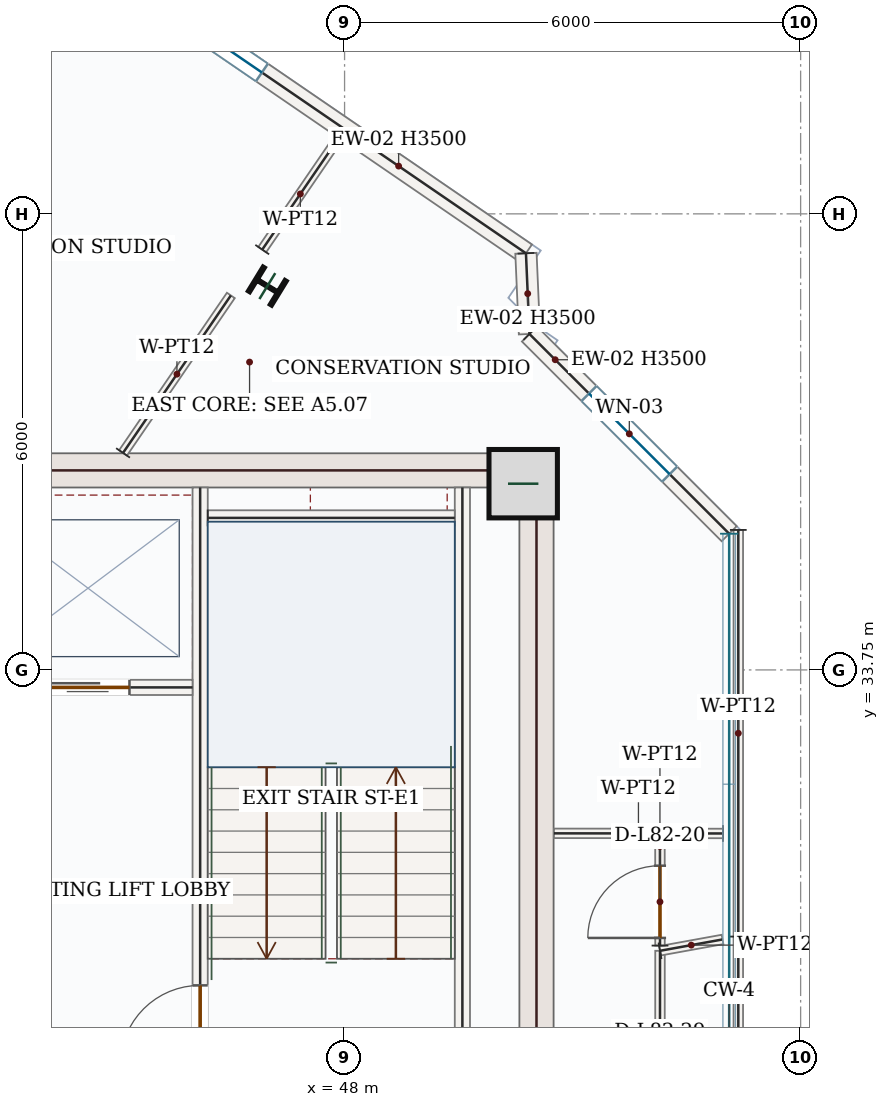
"""IFC4 building model, lengths in metres.
Left out: names, types, materials, properties, quantities, classifications, styles, units other than length and angle.
Written with IfcOpenShell. Run it as: python <this file> out.ifc"""

import sys

from ifc_helpers import new_model, si_unit, direction, frame, frame_2d, origin, origin_2d, place, context, subcontext, project, spatial, rectangle, i_section, extrude, source, transform, mapped, element, fill, save


model = new_model("IFC4")
c1 = context("Model", 3, precision=1e-05, world=origin(), true_north=direction((0.0, 1.0)))
c2 = subcontext(c1, "Body", "Model", "MODEL_VIEW")
j1 = project(units=[si_unit("LENGTHUNIT", "METRE"), si_unit("PLANEANGLEUNIT", "RADIAN")], contexts=[c1])
p1 = place(None, origin())
s1 = spatial("IfcSite", under=j1, at=p1, CompositionType="ELEMENT")
p2 = place(p1, origin())
s2 = spatial("IfcBuilding", under=s1, at=p2, CompositionType="ELEMENT")
p3 = place(p2, frame((0.0, 0.0, 338.55)))
s3 = spatial("IfcBuildingStorey", under=s2, at=p3, CompositionType="ELEMENT", Elevation=338.55)
m1 = source(origin(), c2, "Body", "SweptSolid", [
    extrude(rectangle(XDim=8.55, YDim=0.45, at=frame_2d((4.275, 0.0))), origin(), (0.0, 0.0, 1.0), 3.5),
])
p4 = place(p3, frame((50.525, 28.05, 0.0), z_axis=(0.0, 0.0, 1.0), x_axis=(0.0, 1.0, 0.0)))
e1 = element("IfcWall", 1, at=p4, inside=s3, PredefinedType="SHEAR", context=c2, shape_type="MappedRepresentation", body=[
    mapped(m1, transform((0.0, 0.0, 0.0), x_axis=(1.0, 0.0, 0.0), y_axis=(0.0, 1.0, 0.0), z_axis=(0.0, 0.0, 1.0), scale=1.0)),
])
m2 = source(origin(), c2, "Body", "SweptSolid", [
    extrude(rectangle(XDim=7.1, YDim=0.45, at=frame_2d((3.55, 0.0))), origin(), (0.0, 0.0, 1.0), 3.5),
])
p5 = place(p3, frame((43.2, 36.375, 0.0), z_axis=(0.0, 0.0, 1.0), x_axis=(1.0, 0.0, 0.0)))
e2 = element("IfcWall", 2, at=p5, inside=s3, PredefinedType="SHEAR", context=c2, shape_type="MappedRepresentation", body=[
    mapped(m2, transform((0.0, 0.0, 0.0), x_axis=(1.0, 0.0, 0.0), y_axis=(0.0, 1.0, 0.0), z_axis=(0.0, 0.0, 1.0), scale=1.0)),
])
m3 = source(origin(), c2, "Body", "SweptSolid", [
    extrude(rectangle(XDim=0.9, YDim=0.9, at=origin_2d()), origin(), (0.0, 0.0, 1.0), 3.75),
])
p6 = place(p3, frame((50.35, 36.2, 0.0), z_axis=(0.0, 0.0, 1.0), x_axis=(1.0, 0.0, 0.0)))
e3 = element("IfcColumn", 3, at=p6, inside=s3, PredefinedType="COLUMN", context=c2, shape_type="MappedRepresentation", body=[
    mapped(m3, transform((0.0, 0.0, 0.0), x_axis=(1.0, 0.0, 0.0), y_axis=(0.0, 1.0, 0.0), z_axis=(0.0, 0.0, 1.0), scale=1.0)),
])
m4 = source(origin(), c2, "Body", "SweptSolid", [
    extrude(i_section(OverallWidth=0.369, OverallDepth=0.356, WebThickness=0.011, FlangeThickness=0.018, FilletRadius=0.018, at=origin_2d()), origin(), (0.0, 0.0, 1.0), 3.75),
])
p7 = place(p3, frame((46.984, 38.8, 0.0), z_axis=(0.0, 0.0, 1.0), x_axis=(0.522498564716, 0.852640164354, 0.0)))
e4 = element("IfcColumn", 4, at=p7, inside=s3, PredefinedType="COLUMN", context=c2, shape_type="MappedRepresentation", body=[
    mapped(m4, transform((0.0, 0.0, 0.0), x_axis=(1.0, 0.0, 0.0), y_axis=(0.0, 1.0, 0.0), z_axis=(0.0, 0.0, 1.0), scale=1.0)),
])
p8 = place(p3, frame((42.201, 44.836, 0.0), z_axis=(0.0, 0.0, 1.0), x_axis=(0.825121888295, -0.56495474992, 0.0)))
e5 = element("IfcWall", 5, at=p8, inside=s3, PredefinedType="SOLIDWALL", context=c2, shape_type="SweptSolid", body=[
    extrude(rectangle(XDim=9.92, YDim=0.28, at=frame_2d((4.96, 0.0))), origin(), (0.0, 0.0, 1.0), 3.5),
])
p9 = place(p8, frame((4.21, 0.0, 0.85)))
e6 = element("IfcOpeningElement", 6, at=p9, cuts=e5, PredefinedType="OPENING", context=c2, shape_type="SweptSolid", body=[
    extrude(rectangle(XDim=1.5, YDim=1.5, at=frame_2d((0.75, 0.75))), frame((0.0, 0.15, 0.0), z_axis=(0.0, -1.0, 0.0), x_axis=(1.0, 0.0, 0.0)), (0.0, 0.0, 1.0), 0.3),
])
m5 = source(origin(), c2, "Body", "SweptSolid", [
    extrude(rectangle(XDim=1.063, YDim=0.28, at=frame_2d((0.531, 0.0))), origin(), (0.0, 0.0, 1.0), 3.5),
])
p10 = place(p3, frame((50.386, 39.231, 0.0), z_axis=(0.0, 0.0, 1.0), x_axis=(0.043417286211, -0.999057025028, 0.0)))
e7 = element("IfcWall", 7, at=p10, inside=s3, PredefinedType="SOLIDWALL", context=c2, shape_type="MappedRepresentation", body=[
    mapped(m5, transform((0.0, 0.0, 0.0), x_axis=(1.0, 0.0, 0.0), y_axis=(0.0, 1.0, 0.0), z_axis=(0.0, 0.0, 1.0), scale=1.0)),
])
p11 = place(p3, frame((50.432, 38.17, 0.0), z_axis=(0.0, 0.0, 1.0), x_axis=(0.707106781187, -0.707106781187, 0.0)))
e8 = element("IfcWall", 8, at=p11, inside=s3, PredefinedType="SOLIDWALL", context=c2, shape_type="SweptSolid", body=[
    extrude(rectangle(XDim=3.716, YDim=0.28, at=frame_2d((1.858, 0.0))), origin(), (0.0, 0.0, 1.0), 3.5),
])
p12 = place(p11, frame((1.108, 0.0, 0.85)))
e9 = element("IfcOpeningElement", 9, at=p12, cuts=e8, PredefinedType="OPENING", context=c2, shape_type="SweptSolid", body=[
    extrude(rectangle(XDim=1.5, YDim=1.5, at=frame_2d((0.75, 0.75))), frame((0.0, 0.15, 0.0), z_axis=(0.0, -1.0, 0.0), x_axis=(1.0, 0.0, 0.0)), (0.0, 0.0, 1.0), 0.3),
])
m6 = source(origin(), c2, "Body", "SweptSolid", [
    extrude(rectangle(XDim=7.87, YDim=0.2, at=frame_2d((3.935, 0.0))), origin(), (0.0, 0.0, 1.0), 3.5),
])
p13 = place(p3, frame((49.55, 28.28, 0.0), z_axis=(0.0, 0.0, 1.0), x_axis=(0.0, 1.0, 0.0)))
e10 = element("IfcWall", 10, at=p13, inside=s3, PredefinedType="SOLIDWALL", context=c2, shape_type="MappedRepresentation", body=[
    mapped(m6, transform((0.0, 0.0, 0.0), x_axis=(1.0, 0.0, 0.0), y_axis=(0.0, 1.0, 0.0), z_axis=(0.0, 0.0, 1.0), scale=1.0)),
])
p14 = place(p3, frame((46.1, 28.15, 0.0), z_axis=(0.0, 0.0, 1.0), x_axis=(0.0, 1.0, 0.0)))
e11 = element("IfcWall", 11, at=p14, inside=s3, PredefinedType="SOLIDWALL", context=c2, shape_type="SweptSolid", body=[
    extrude(rectangle(XDim=8.0, YDim=0.2, at=frame_2d((4.0, 0.0))), origin(), (0.0, 0.0, 1.0), 3.5),
])
p15 = place(p14, frame((0.4, 0.0, 0.0)))
e12 = element("IfcOpeningElement", 12, at=p15, cuts=e11, PredefinedType="OPENING", context=c2, shape_type="SweptSolid", body=[
    extrude(rectangle(XDim=1.05, YDim=2.15, at=frame_2d((0.525, 1.075))), frame((0.0, 0.11, 0.0), z_axis=(0.0, -1.0, 0.0), x_axis=(1.0, 0.0, 0.0)), (0.0, 0.0, 1.0), 0.22),
])
m7 = source(origin(), c2, "Body", "SweptSolid", [
    extrude(rectangle(XDim=3.25, YDim=0.2, at=frame_2d((1.625, 0.0))), origin(), (0.0, 0.0, 1.0), 3.5),
])
p16 = place(p3, frame((46.2, 35.75, 0.0), z_axis=(0.0, 0.0, 1.0), x_axis=(1.0, 0.0, 0.0)))
e13 = element("IfcWall", 13, at=p16, inside=s3, PredefinedType="SOLIDWALL", context=c2, shape_type="MappedRepresentation", body=[
    mapped(m7, transform((0.0, 0.0, 0.0), x_axis=(1.0, 0.0, 0.0), y_axis=(0.0, 1.0, 0.0), z_axis=(0.0, 0.0, 1.0), scale=1.0)),
])
p17 = place(p3, frame((43.25, 33.52, 0.0), z_axis=(0.0, 0.0, 1.0), x_axis=(1.0, 0.0, 0.0)))
e14 = element("IfcWall", 14, at=p17, inside=s3, PredefinedType="SOLIDWALL", context=c2, shape_type="SweptSolid", body=[
    extrude(rectangle(XDim=2.75, YDim=0.2, at=frame_2d((1.375, 0.0))), origin(), (0.0, 0.0, 1.0), 3.5),
])
p18 = place(p17, frame((0.82, 0.0, 0.0)))
e15 = element("IfcOpeningElement", 15, at=p18, cuts=e14, PredefinedType="OPENING", context=c2, shape_type="SweptSolid", body=[
    extrude(rectangle(XDim=1.1, YDim=2.15, at=frame_2d((0.55, 1.075))), frame((0.0, 0.11, 0.0), z_axis=(0.0, -1.0, 0.0), x_axis=(1.0, 0.0, 0.0)), (0.0, 0.0, 1.0), 0.22),
])
p19 = place(p3, frame((52.147, 22.47, 0.0), z_axis=(0.0, 0.0, 1.0), x_axis=(0.000321874581, 0.999999948198, 0.0)))
e16 = element("IfcWall", 16, at=p19, inside=s3, PredefinedType="PARTITIONING", context=c2, shape_type="SweptSolid", body=[
    extrude(rectangle(XDim=7.585, YDim=0.125, at=frame_2d((3.792, 0.0))), origin(), (0.0, 0.0, 1.0), 3.5),
])
p20 = place(p19, frame((5.175, 0.0, 0.0)))
e17 = element("IfcOpeningElement", 17, at=p20, cuts=e16, PredefinedType="OPENING", context=c2, shape_type="SweptSolid", body=[
    extrude(rectangle(XDim=0.95, YDim=2.15, at=frame_2d((0.475, 1.075))), frame((0.0, 0.073, 0.0), z_axis=(0.0, -1.0, 0.0), x_axis=(1.0, 0.0, 0.0)), (0.0, 0.0, 1.0), 0.145),
])
m8 = source(origin(), c2, "Body", "SweptSolid", [
    extrude(rectangle(XDim=0.836, YDim=0.125, at=frame_2d((0.418, 0.0))), origin(), (0.0, 0.0, 1.0), 3.5),
])
p21 = place(p3, frame((52.15, 30.055, 0.0), z_axis=(0.0, 0.0, 1.0), x_axis=(0.983949253333, 0.178448499195, 0.0)))
e18 = element("IfcWall", 18, at=p21, inside=s3, PredefinedType="PARTITIONING", context=c2, shape_type="MappedRepresentation", body=[
    mapped(m8, transform((0.0, 0.0, 0.0), x_axis=(1.0, 0.0, 0.0), y_axis=(0.0, 1.0, 0.0), z_axis=(0.0, 0.0, 1.0), scale=1.0)),
])
m9 = source(origin(), c2, "Body", "SweptSolid", [
    extrude(rectangle(XDim=6.777, YDim=0.125, at=frame_2d((3.388, 0.0))), origin(), (0.0, 0.0, 1.0), 3.5),
])
p22 = place(p3, frame((53.18, 30.242, 0.0), z_axis=(0.0, 0.0, 1.0), x_axis=(7.2053896e-05, -0.999999997404, 0.0)))
e19 = element("IfcWall", 19, at=p22, inside=s3, PredefinedType="PARTITIONING", context=c2, shape_type="MappedRepresentation", body=[
    mapped(m9, transform((0.0, 0.0, 0.0), x_axis=(1.0, 0.0, 0.0), y_axis=(0.0, 1.0, 0.0), z_axis=(0.0, 0.0, 1.0), scale=1.0)),
])
m10 = source(origin(), c2, "Body", "SweptSolid", [
    extrude(rectangle(XDim=2.223, YDim=0.125, at=frame_2d((1.111, 0.0))), origin(), (0.0, 0.0, 1.0), 3.5),
])
p23 = place(p3, frame((52.978, 31.598, 0.0), z_axis=(0.0, 0.0, 1.0), x_axis=(-0.999999704402, 0.000768892567, 0.0)))
e20 = element("IfcWall", 20, at=p23, inside=s3, PredefinedType="PARTITIONING", context=c2, shape_type="MappedRepresentation", body=[
    mapped(m10, transform((0.0, 0.0, 0.0), x_axis=(1.0, 0.0, 0.0), y_axis=(0.0, 1.0, 0.0), z_axis=(0.0, 0.0, 1.0), scale=1.0)),
])
m11 = source(origin(), c2, "Body", "SweptSolid", [
    extrude(rectangle(XDim=2.511, YDim=0.125, at=frame_2d((1.255, 0.0))), origin(), (0.0, 0.0, 1.0), 3.5),
])
p24 = place(p3, frame((45.085, 36.605, 0.0), z_axis=(0.0, 0.0, 1.0), x_axis=(0.564980194272, 0.825104466162, 0.0)))
e21 = element("IfcWall", 21, at=p24, inside=s3, PredefinedType="PARTITIONING", context=c2, shape_type="MappedRepresentation", body=[
    mapped(m11, transform((0.0, 0.0, 0.0), x_axis=(1.0, 0.0, 0.0), y_axis=(0.0, 1.0, 0.0), z_axis=(0.0, 0.0, 1.0), scale=1.0)),
])
m12 = source(origin(), c2, "Body", "SweptSolid", [
    extrude(rectangle(XDim=1.775, YDim=0.125, at=frame_2d((0.888, 0.0))), origin(), (0.0, 0.0, 1.0), 3.5),
])
p25 = place(p3, frame((46.917, 39.28, 0.0), z_axis=(0.0, 0.0, 1.0), x_axis=(0.56509798207, 0.825023800057, 0.0)))
e22 = element("IfcWall", 22, at=p25, inside=s3, PredefinedType="PARTITIONING", context=c2, shape_type="MappedRepresentation", body=[
    mapped(m12, transform((0.0, 0.0, 0.0), x_axis=(1.0, 0.0, 0.0), y_axis=(0.0, 1.0, 0.0), z_axis=(0.0, 0.0, 1.0), scale=1.0)),
])
m13 = source(origin(), c2, "Body", "SweptSolid", [
    extrude(rectangle(XDim=5.35, YDim=0.125, at=frame_2d((2.675, 0.0))), origin(), (0.0, 0.0, 1.0), 3.5),
])
p26 = place(p3, frame((53.18, 35.592, 0.0), z_axis=(0.0, 0.0, 1.0), x_axis=(0.0, -1.0, 0.0)))
e23 = element("IfcWall", 23, at=p26, inside=s3, PredefinedType="PARTITIONING", context=c2, shape_type="MappedRepresentation", body=[
    mapped(m13, transform((0.0, 0.0, 0.0), x_axis=(1.0, 0.0, 0.0), y_axis=(0.0, 1.0, 0.0), z_axis=(0.0, 0.0, 1.0), scale=1.0)),
])
p27 = place(p3, frame((52.15, 30.124, 0.0), z_axis=(0.0, 0.0, 1.0), x_axis=(-0.000520201074, 0.999999864695, 0.0)))
e24 = element("IfcWall", 24, at=p27, inside=s3, PredefinedType="PARTITIONING", context=c2, shape_type="SweptSolid", body=[
    extrude(rectangle(XDim=1.408, YDim=0.125, at=frame_2d((0.704, 0.0))), origin(), (0.0, 0.0, 1.0), 3.5),
])
p28 = place(p27, frame((0.101, 0.0, 0.0)))
e25 = element("IfcOpeningElement", 25, at=p28, cuts=e24, PredefinedType="OPENING", context=c2, shape_type="SweptSolid", body=[
    extrude(rectangle(XDim=0.95, YDim=2.15, at=frame_2d((0.475, 1.075))), frame((0.0, 0.073, 0.0), z_axis=(0.0, -1.0, 0.0), x_axis=(1.0, 0.0, 0.0)), (0.0, 0.0, 1.0), 0.145),
])
m14 = source(origin(), c2, "Body", "SweptSolid", [
    extrude(rectangle(XDim=1.5, YDim=1.5, at=frame_2d((0.75, 0.75))), frame((0.0, 0.03, 0.0), z_axis=(0.0, -1.0, 0.0), x_axis=(1.0, 0.0, 0.0)), (0.0, 0.0, 1.0), 0.06),
])
p29 = place(p9, origin())
e26 = element("IfcWindow", 26, at=p29, inside=s3, PartitioningType="SINGLE_PANEL", PredefinedType="WINDOW", context=c2, shape_type="MappedRepresentation", body=[
    mapped(m14, transform((0.0, 0.0, 0.0), x_axis=(1.0, 0.0, 0.0), y_axis=(0.0, 1.0, 0.0), z_axis=(0.0, 0.0, 1.0), scale=1.0)),
])
fill(e6, e26)
p30 = place(p12, origin())
e27 = element("IfcWindow", 27, at=p30, inside=s3, PartitioningType="SINGLE_PANEL", PredefinedType="WINDOW", context=c2, shape_type="MappedRepresentation", body=[
    mapped(m14, transform((0.0, 0.0, 0.0), x_axis=(1.0, 0.0, 0.0), y_axis=(0.0, 1.0, 0.0), z_axis=(0.0, 0.0, 1.0), scale=1.0)),
])
fill(e9, e27)
m15 = source(origin(), c2, "Body", "SweptSolid", [
    extrude(rectangle(XDim=1.05, YDim=2.15, at=frame_2d((0.525, 1.075))), frame((0.0, 0.025, 0.0), z_axis=(0.0, -1.0, 0.0), x_axis=(1.0, 0.0, 0.0)), (0.0, 0.0, 1.0), 0.05),
])
p31 = place(p15, origin())
e28 = element("IfcDoor", 28, at=p31, inside=s3, OperationType="SINGLE_SWING_LEFT", PredefinedType="DOOR", context=c2, shape_type="MappedRepresentation", body=[
    mapped(m15, transform((0.0, 0.0, 0.0), x_axis=(1.0, 0.0, 0.0), y_axis=(0.0, 1.0, 0.0), z_axis=(0.0, 0.0, 1.0), scale=1.0)),
])
fill(e12, e28)
m16 = source(origin(), c2, "Body", "SweptSolid", [
    extrude(rectangle(XDim=1.1, YDim=2.15, at=frame_2d((0.55, 1.075))), frame((0.0, 0.025, 0.0), z_axis=(0.0, -1.0, 0.0), x_axis=(1.0, 0.0, 0.0)), (0.0, 0.0, 1.0), 0.05),
])
p32 = place(p18, origin())
e29 = element("IfcDoor", 29, at=p32, inside=s3, OperationType="DOUBLE_DOOR_SLIDING", PredefinedType="DOOR", context=c2, shape_type="MappedRepresentation", body=[
    mapped(m16, transform((0.0, 0.0, 0.0), x_axis=(1.0, 0.0, 0.0), y_axis=(0.0, 1.0, 0.0), z_axis=(0.0, 0.0, 1.0), scale=1.0)),
])
fill(e15, e29)
m17 = source(origin(), c2, "Body", "SweptSolid", [
    extrude(rectangle(XDim=0.95, YDim=2.15, at=frame_2d((0.475, 1.075))), frame((0.0, 0.025, 0.0), z_axis=(0.0, -1.0, 0.0), x_axis=(1.0, 0.0, 0.0)), (0.0, 0.0, 1.0), 0.05),
])
p33 = place(p28, origin())
e30 = element("IfcDoor", 30, at=p33, inside=s3, OperationType="SINGLE_SWING_LEFT", PredefinedType="DOOR", context=c2, shape_type="MappedRepresentation", body=[
    mapped(m17, transform((0.0, 0.0, 0.0), x_axis=(1.0, 0.0, 0.0), y_axis=(0.0, 1.0, 0.0), z_axis=(0.0, 0.0, 1.0), scale=1.0)),
])
fill(e25, e30)
save(model, sys.argv[1])
